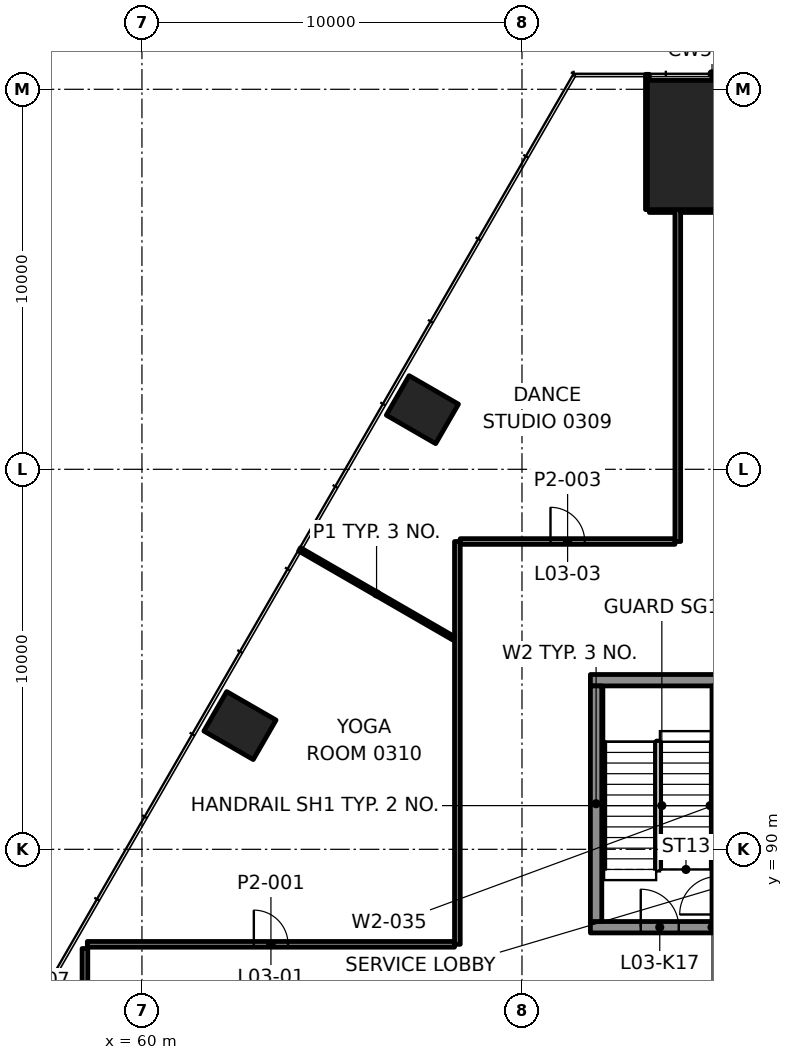
"""IFC4 building model, lengths in metres.
Left out: names, types, materials, properties, quantities, classifications, styles, units other than length and angle.
Written with IfcOpenShell. Run it as: python <this file> out.ifc"""

import sys

from ifc_helpers import new_model, si_unit, direction, frame, frame_2d, origin, origin_2d, place, context, subcontext, project, spatial, rectangle, extrude, element, fill, save


model = new_model("IFC4")
c1 = context("Model", 3, precision=1e-05, world=origin(), true_north=direction((0.0, 1.0)))
c2 = subcontext(c1, "Body", "Model", "MODEL_VIEW")
j1 = project(units=[si_unit("LENGTHUNIT", "METRE"), si_unit("PLANEANGLEUNIT", "RADIAN")], contexts=[c1])
p1 = place(None, origin())
s1 = spatial("IfcSite", under=j1, at=p1, CompositionType="ELEMENT")
p2 = place(p1, origin())
s2 = spatial("IfcBuilding", under=s1, at=p2, CompositionType="ELEMENT")
p3 = place(p2, frame((0.0, 0.0, 17.2)))
s3 = spatial("IfcBuildingStorey", under=s2, at=p3, CompositionType="ELEMENT", Elevation=17.2)
p4 = place(p3, frame((75.0, 108.534, 0.0), z_axis=(0.0, 0.0, 1.0), x_axis=(-1.0, 0.0, 0.0)))
e1 = element("IfcColumn", 1, at=p4, inside=s3, PredefinedType="COLUMN", context=c2, shape_type="SweptSolid", body=[
    extrude(rectangle(XDim=3.4, YDim=3.4, at=origin_2d()), origin(), (0.0, 0.0, 1.0), 4.6),
])
for number, where, z_axis, x_axis in (
    (2, (67.379, 101.57, -0.0), (0.0, 0.0, 1.0), (-0.5, -0.866, 0.0)),
    (3, (62.579, 93.256, -0.0), (0.0, 0.0, 1.0), (-0.5, -0.866, 0.0)),
):
    element("IfcColumn", number, at=place(p3, frame(where, z_axis=z_axis, x_axis=x_axis)), inside=s3, PredefinedType="COLUMN", context=c2, shape_type="SweptSolid", body=[
        extrude(rectangle(XDim=1.2, YDim=1.5, at=origin_2d()), origin(), (0.0, 0.0, 1.0), 4.6),
    ])
p5 = place(p3, frame((71.8, 87.95, 0.0), z_axis=(0.0, 0.0, 1.0), x_axis=(1.0, 0.0, 0.0)))
e4 = element("IfcWall", 4, at=p5, inside=s3, PredefinedType="SHEAR", context=c2, shape_type="SweptSolid", body=[
    extrude(rectangle(XDim=6.4, YDim=0.3, at=frame_2d((3.2, 0.0))), origin(), (0.0, 0.0, 1.0), 4.3),
])
p6 = place(p5, frame((1.325, 0.0, 0.0)))
e5 = element("IfcOpeningElement", 5, at=p6, cuts=e4, PredefinedType="OPENING", context=c2, shape_type="SweptSolid", body=[
    extrude(rectangle(XDim=1.0, YDim=2.1, at=frame_2d((0.5, 1.05))), frame((0.0, 0.16, 0.0), z_axis=(0.0, -1.0, 0.0), x_axis=(1.0, 0.0, 0.0)), (0.0, 0.0, 1.0), 0.32),
])
p7 = place(p5, frame((4.125, 0.0, 0.0)))
e6 = element("IfcOpeningElement", 6, at=p7, cuts=e4, PredefinedType="OPENING", context=c2, shape_type="SweptSolid", body=[
    extrude(rectangle(XDim=1.2, YDim=2.1, at=frame_2d((0.6, 1.05))), frame((0.0, 0.16, 0.0), z_axis=(0.0, -1.0, 0.0), x_axis=(1.0, 0.0, 0.0)), (0.0, 0.0, 1.0), 0.32),
])
p8 = place(p3, frame((71.8, 94.45, 0.0), z_axis=(0.0, 0.0, 1.0), x_axis=(1.0, 0.0, 0.0)))
e7 = element("IfcWall", 7, at=p8, inside=s3, PredefinedType="SHEAR", context=c2, shape_type="SweptSolid", body=[
    extrude(rectangle(XDim=6.4, YDim=0.3, at=frame_2d((3.2, 0.0))), origin(), (0.0, 0.0, 1.0), 4.3),
])
p9 = place(p3, frame((71.95, 88.1, 0.0), z_axis=(0.0, 0.0, 1.0), x_axis=(0.0, 1.0, 0.0)))
e8 = element("IfcWall", 8, at=p9, inside=s3, PredefinedType="SHEAR", context=c2, shape_type="SweptSolid", body=[
    extrude(rectangle(XDim=6.2, YDim=0.3, at=frame_2d((3.1, 0.0))), origin(), (0.0, 0.0, 1.0), 4.3),
])
p10 = place(p3, frame((75.15, 88.1, 0.0), z_axis=(0.0, 0.0, 1.0), x_axis=(0.0, 1.0, 0.0)))
e9 = element("IfcWall", 9, at=p10, inside=s3, PredefinedType="SHEAR", context=c2, shape_type="SweptSolid", body=[
    extrude(rectangle(XDim=6.2, YDim=0.3, at=frame_2d((3.1, 0.0))), origin(), (0.0, 0.0, 1.0), 4.3),
])
p11 = place(p10, frame((0.185, 0.0, 0.0)))
e10 = element("IfcOpeningElement", 10, at=p11, cuts=e9, PredefinedType="OPENING", context=c2, shape_type="SweptSolid", body=[
    extrude(rectangle(XDim=1.0, YDim=2.1, at=frame_2d((0.5, 1.05))), frame((0.0, 0.16, 0.0), z_axis=(0.0, -1.0, 0.0), x_axis=(1.0, 0.0, 0.0)), (0.0, 0.0, 1.0), 0.32),
])
p12 = place(p3, frame((58.563, 87.5, 0.0), z_axis=(0.0, 0.0, 1.0), x_axis=(1.0, 0.0, 0.0)))
e11 = element("IfcWall", 11, at=p12, inside=s3, PredefinedType="PARTITIONING", context=c2, shape_type="SweptSolid", body=[
    extrude(rectangle(XDim=9.662, YDim=0.15, at=frame_2d((4.831, 0.0))), origin(), (0.0, 0.0, 1.0), 3.465),
])
p13 = place(p12, frame((4.381, 0.0, 0.0)))
e12 = element("IfcOpeningElement", 12, at=p13, cuts=e11, PredefinedType="OPENING", context=c2, shape_type="SweptSolid", body=[
    extrude(rectangle(XDim=0.9, YDim=2.1, at=frame_2d((0.45, 1.05))), frame((0.0, 0.085, 0.0), z_axis=(0.0, -1.0, 0.0), x_axis=(1.0, 0.0, 0.0)), (0.0, 0.0, 1.0), 0.17),
])
p14 = place(p3, frame((68.375, 98.1, 0.0), z_axis=(0.0, 0.0, 1.0), x_axis=(1.0, 0.0, 0.0)))
e13 = element("IfcWall", 13, at=p14, inside=s3, PredefinedType="PARTITIONING", context=c2, shape_type="SweptSolid", body=[
    extrude(rectangle(XDim=5.649, YDim=0.15, at=frame_2d((2.825, 0.0))), origin(), (0.0, 0.0, 1.0), 3.7),
])
p15 = place(p14, frame((2.375, 0.0, 0.0)))
e14 = element("IfcOpeningElement", 14, at=p15, cuts=e13, PredefinedType="OPENING", context=c2, shape_type="SweptSolid", body=[
    extrude(rectangle(XDim=0.9, YDim=2.1, at=frame_2d((0.45, 1.05))), frame((0.0, 0.085, 0.0), z_axis=(0.0, -1.0, 0.0), x_axis=(1.0, 0.0, 0.0)), (0.0, 0.0, 1.0), 0.17),
])
p16 = place(p3, frame((73.351, 106.834, 0.0), z_axis=(0.0, 0.0, 1.0), x_axis=(1.0, 0.0, 0.0)))
e15 = element("IfcWall", 15, at=p16, inside=s3, PredefinedType="PARTITIONING", context=c2, shape_type="SweptSolid", body=[
    extrude(rectangle(XDim=0.674, YDim=0.15, at=frame_2d((0.337, 0.0))), origin(), (0.0, 0.0, 1.0), 3.7),
])
p17 = place(p3, frame((74.1, 98.1, 0.0), z_axis=(0.0, 0.0, 1.0), x_axis=(0.0, 1.0, 0.0)))
e16 = element("IfcWall", 16, at=p17, inside=s3, PredefinedType="PARTITIONING", context=c2, shape_type="SweptSolid", body=[
    extrude(rectangle(XDim=8.734, YDim=0.15, at=frame_2d((4.367, 0.0))), origin(), (0.0, 0.0, 1.0), 3.7),
])
p18 = place(p3, frame((73.3, 106.834, 0.0), z_axis=(0.0, 0.0, 1.0), x_axis=(0.0, 1.0, 0.0)))
e17 = element("IfcWall", 17, at=p18, inside=s3, PredefinedType="PARTITIONING", context=c2, shape_type="SweptSolid", body=[
    extrude(rectangle(XDim=3.56, YDim=0.1, at=frame_2d((1.78, 0.0))), origin(), (0.0, 0.0, 1.0), 3.7),
])
p19 = place(p3, frame((68.3, 87.5, 0.0), z_axis=(0.0, 0.0, 1.0), x_axis=(0.0, 1.0, 0.0)))
e18 = element("IfcWall", 18, at=p19, inside=s3, PredefinedType="PARTITIONING", context=c2, shape_type="SweptSolid", body=[
    extrude(rectangle(XDim=10.6, YDim=0.15, at=frame_2d((5.3, 0.0))), origin(), (0.0, 0.0, 1.0), 3.7),
])
p20 = place(p3, frame((58.5, 85.219, 0.0), z_axis=(0.0, 0.0, 1.0), x_axis=(0.0, 1.0, 0.0)))
e19 = element("IfcWall", 19, at=p20, inside=s3, PredefinedType="PARTITIONING", context=c2, shape_type="SweptSolid", body=[
    extrude(rectangle(XDim=2.17, YDim=0.15, at=frame_2d((1.085, 0.0))), origin(), (0.0, 0.0, 1.0), 3.465),
])
p21 = place(p3, frame((68.199, 95.554, 0.0), z_axis=(0.0, 0.0, 1.0), x_axis=(-0.866034346295, 0.499984510798, 0.0)))
e20 = element("IfcWall", 20, at=p21, inside=s3, PredefinedType="PARTITIONING", context=c2, shape_type="SweptSolid", body=[
    extrude(rectangle(XDim=4.677, YDim=0.1, at=frame_2d((2.339, 0.0))), origin(), (0.0, 0.0, 1.0), 3.465),
])
p22 = place(p3, frame((74.175, 106.834, 0.0), z_axis=(0.0, 0.0, 1.0), x_axis=(1.0, 0.0, 0.0)))
e21 = element("IfcWall", 21, at=p22, inside=s3, PredefinedType="PARTITIONING", context=c2, shape_type="SweptSolid", body=[
    extrude(rectangle(XDim=1.649, YDim=0.15, at=frame_2d((0.825, 0.0))), origin(), (0.0, 0.0, 1.0), 3.697),
])
p23 = place(p13, origin())
e22 = element("IfcDoor", 22, at=p23, inside=s3, OperationType="SINGLE_SWING_LEFT", PredefinedType="DOOR", context=c2, shape_type="SweptSolid", body=[
    extrude(rectangle(XDim=0.9, YDim=2.1, at=frame_2d((0.45, 1.05))), frame((0.0, 0.025, 0.0), z_axis=(0.0, -1.0, 0.0), x_axis=(1.0, 0.0, 0.0)), (0.0, 0.0, 1.0), 0.05),
])
fill(e12, e22)
p24 = place(p15, origin())
e23 = element("IfcDoor", 23, at=p24, inside=s3, OperationType="SINGLE_SWING_RIGHT", PredefinedType="DOOR", context=c2, shape_type="SweptSolid", body=[
    extrude(rectangle(XDim=0.9, YDim=2.1, at=frame_2d((0.45, 1.05))), frame((0.0, 0.025, 0.0), z_axis=(0.0, -1.0, 0.0), x_axis=(1.0, 0.0, 0.0)), (0.0, 0.0, 1.0), 0.05),
])
fill(e14, e23)
p25 = place(p6, origin())
e24 = element("IfcDoor", 24, at=p25, inside=s3, OperationType="SINGLE_SWING_RIGHT", PredefinedType="DOOR", context=c2, shape_type="SweptSolid", body=[
    extrude(rectangle(XDim=1.0, YDim=2.1, at=frame_2d((0.5, 1.05))), frame((0.0, 0.025, 0.0), z_axis=(0.0, -1.0, 0.0), x_axis=(1.0, 0.0, 0.0)), (0.0, 0.0, 1.0), 0.05),
])
fill(e5, e24)
save(model, sys.argv[1])
